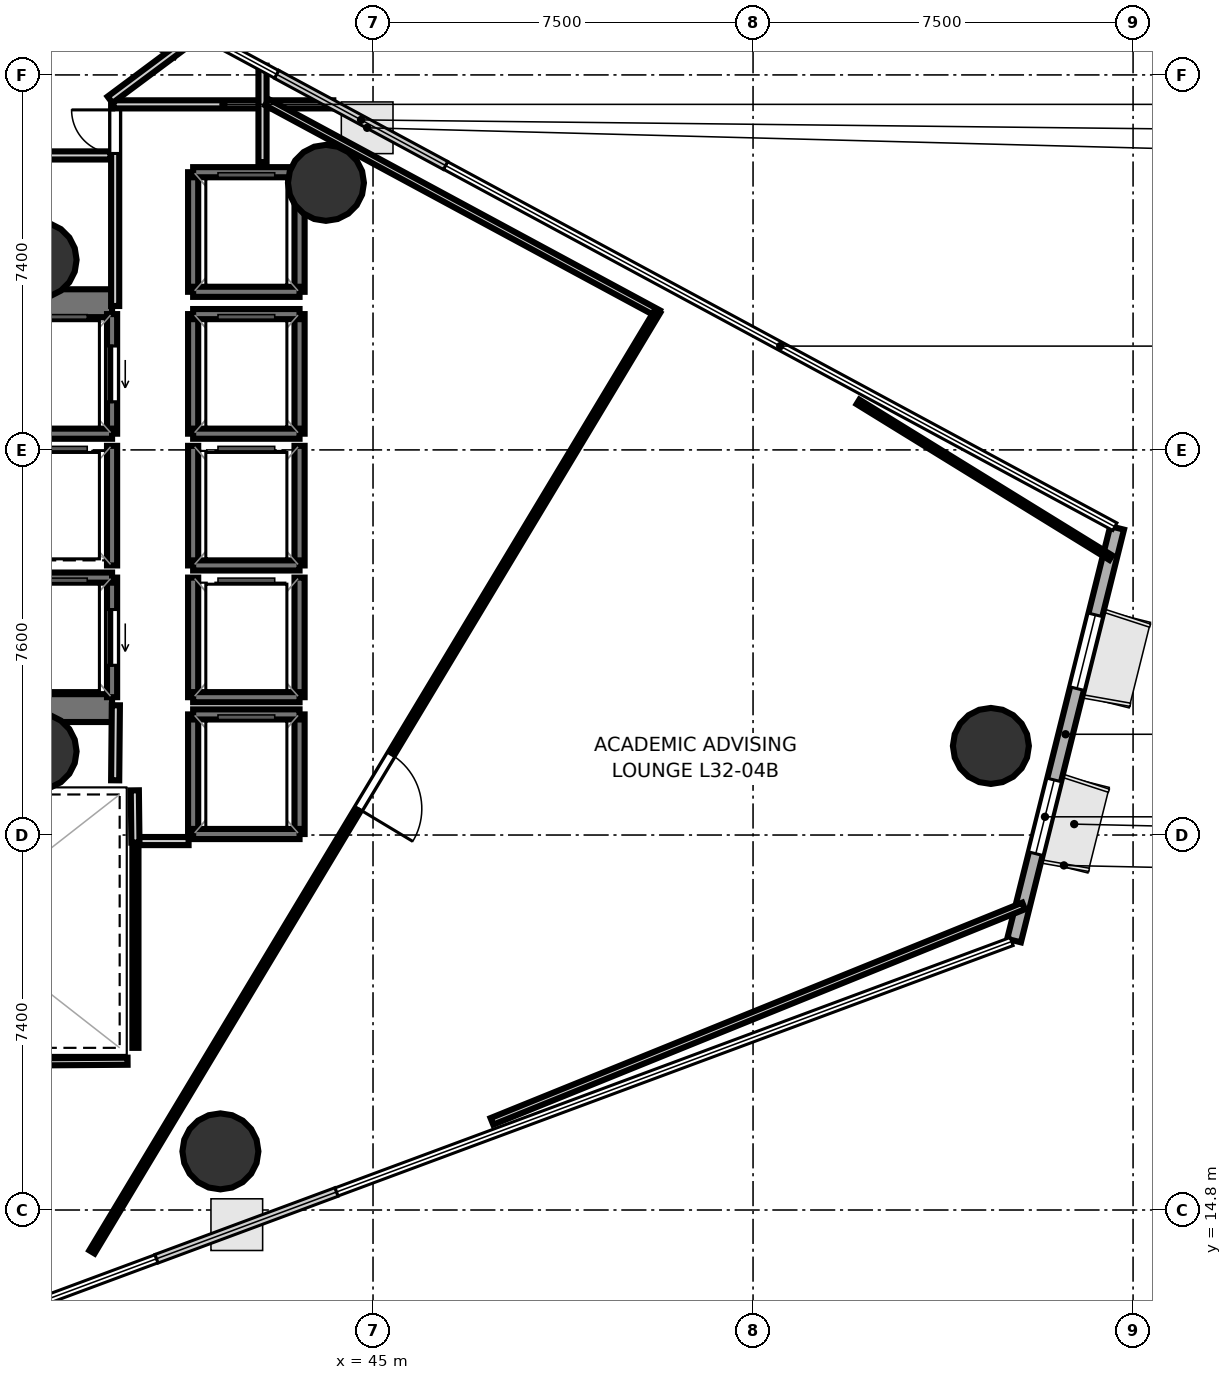
"""IFC4 building model, lengths in metres.
Left out: names, types, materials, properties, quantities, classifications, styles, units other than length and angle.
Written with IfcOpenShell. Run it as: python <this file> out.ifc"""

import sys

from ifc_helpers import new_model, si_unit, direction, frame, frame_2d, origin, origin_2d, place, context, subcontext, project, spatial, rectangle, hollow_circle, extrude, element, fill, save


model = new_model("IFC4")
c1 = context("Model", 3, precision=1e-05, world=origin(), true_north=direction((0.0, 1.0)))
c2 = subcontext(c1, "Body", "Model", "MODEL_VIEW")
j1 = project(units=[si_unit("LENGTHUNIT", "METRE"), si_unit("PLANEANGLEUNIT", "RADIAN")], contexts=[c1])
p1 = place(None, origin())
s1 = spatial("IfcSite", under=j1, at=p1, CompositionType="ELEMENT")
p2 = place(p1, origin())
s2 = spatial("IfcBuilding", under=s1, at=p2, CompositionType="ELEMENT")
p3 = place(p2, frame((0.0, 0.0, 127.4)))
s3 = spatial("IfcBuildingStorey", under=s2, at=p3, CompositionType="ELEMENT", Elevation=127.4)
p4 = place(p3, frame((29.23, 32.695, 0.0), z_axis=(0.0, 0.0, 1.0), x_axis=(1.0, 0.0, 0.0)))
e1 = element("IfcWall", 1, at=p4, inside=s3, PredefinedType="SHEAR", context=c2, shape_type="SweptSolid", body=[
    extrude(rectangle(XDim=10.62, YDim=0.55, at=frame_2d((5.31, 0.0))), origin(), (0.0, 0.0, 1.0), 3.52),
])
p5 = place(p4, frame((0.995, 0.0, 0.0)))
e2 = element("IfcOpeningElement", 2, at=p5, cuts=e1, PredefinedType="OPENING", context=c2, shape_type="SweptSolid", body=[
    extrude(rectangle(XDim=1.25, YDim=2.15, at=frame_2d((0.625, 1.075))), frame((0.0, 0.285, 0.0), z_axis=(0.0, -1.0, 0.0), x_axis=(1.0, 0.0, 0.0)), (0.0, 0.0, 1.0), 0.57),
])
p6 = place(p3, frame((29.23, 24.705, 0.0), z_axis=(0.0, 0.0, 1.0), x_axis=(1.0, 0.0, 0.0)))
e3 = element("IfcWall", 3, at=p6, inside=s3, PredefinedType="SHEAR", context=c2, shape_type="SweptSolid", body=[
    extrude(rectangle(XDim=10.62, YDim=0.55, at=frame_2d((5.31, 0.0))), origin(), (0.0, 0.0, 1.0), 3.52),
])
p7 = place(p6, frame((0.795, 0.0, 0.0)))
e4 = element("IfcOpeningElement", 4, at=p7, cuts=e3, PredefinedType="OPENING", context=c2, shape_type="SweptSolid", body=[
    extrude(rectangle(XDim=1.25, YDim=2.15, at=frame_2d((0.625, 1.075))), frame((0.0, 0.285, 0.0), z_axis=(0.0, -1.0, 0.0), x_axis=(1.0, 0.0, 0.0)), (0.0, 0.0, 1.0), 0.57),
])
for number, where, z_axis, x_axis in (
    (5, (38.4, 33.55, 0.0), (0.0, 0.0, 1.0), (1.0, 0.0, 0.0)),
    (6, (38.4, 23.85, 0.0), (0.0, 0.0, 1.0), (1.0, 0.0, 0.0)),
    (7, (57.194, 23.958, 0.0), (0.0, 0.0, 1.0), (1.0, 0.0, 0.0)),
    (8, (44.071, 35.07, 0.0), (0.0, 0.0, 1.0), (1.0, 0.0, 0.0)),
    (9, (41.988, 15.957, 0.0), (0.0, 0.0, 1.0), (1.0, 0.0, 0.0)),
):
    element("IfcColumn", number, at=place(p3, frame(where, z_axis=z_axis, x_axis=x_axis)), inside=s3, PredefinedType="COLUMN", context=c2, shape_type="SweptSolid", body=[
        extrude(hollow_circle(Radius=0.75, WallThickness=0.036, at=origin_2d()), origin(), (0.0, 0.0, 1.0), 3.7),
    ])
p8 = place(p3, frame((57.651, 20.116, 0.0), z_axis=(0.0, 0.0, 1.0), x_axis=(0.242323480978, 0.970195511516, 0.0)))
e10 = element("IfcWall", 10, at=p8, inside=s3, PredefinedType="SOLIDWALL", context=c2, shape_type="SweptSolid", body=[
    extrude(rectangle(XDim=8.395, YDim=0.28, at=frame_2d((4.197, 0.0))), origin(), (0.0, 0.0, 1.0), 3.52),
])
p9 = place(p8, frame((1.768, 0.0, 0.85)))
e11 = element("IfcOpeningElement", 11, at=p9, cuts=e10, PredefinedType="OPENING", context=c2, shape_type="SweptSolid", body=[
    extrude(rectangle(XDim=1.5, YDim=2.1, at=frame_2d((0.75, 1.05))), frame((0.0, 0.15, 0.0), z_axis=(0.0, -1.0, 0.0), x_axis=(1.0, 0.0, 0.0)), (0.0, 0.0, 1.0), 0.3),
])
p10 = place(p8, frame((5.126, 0.0, 0.85)))
e12 = element("IfcOpeningElement", 12, at=p10, cuts=e10, PredefinedType="OPENING", context=c2, shape_type="SweptSolid", body=[
    extrude(rectangle(XDim=1.5, YDim=2.1, at=frame_2d((0.75, 1.05))), frame((0.0, 0.15, 0.0), z_axis=(0.0, -1.0, 0.0), x_axis=(1.0, 0.0, 0.0)), (0.0, 0.0, 1.0), 0.3),
])
p11 = place(p3, frame((39.85, 30.12, 0.0), z_axis=(0.0, 0.0, 1.0), x_axis=(0.0, 1.0, 0.0)))
e13 = element("IfcWall", 13, at=p11, inside=s3, PredefinedType="SOLIDWALL", context=c2, shape_type="SweptSolid", body=[
    extrude(rectangle(XDim=2.36, YDim=0.2, at=frame_2d((1.18, 0.0))), origin(), (0.0, 0.0, 1.0), 3.52),
])
p12 = place(p11, frame((0.63, 0.0, 0.0)))
e14 = element("IfcOpeningElement", 14, at=p12, cuts=e13, PredefinedType="OPENING", context=c2, shape_type="SweptSolid", body=[
    extrude(rectangle(XDim=1.1, YDim=2.15, at=frame_2d((0.55, 1.075))), frame((0.0, 0.11, 0.0), z_axis=(0.0, -1.0, 0.0), x_axis=(1.0, 0.0, 0.0)), (0.0, 0.0, 1.0), 0.22),
])
p13 = place(p3, frame((37.75, 30.12, 0.0), z_axis=(0.0, 0.0, 1.0), x_axis=(1.0, 0.0, 0.0)))
e15 = element("IfcWall", 15, at=p13, inside=s3, PredefinedType="SOLIDWALL", context=c2, shape_type="SweptSolid", body=[
    extrude(rectangle(XDim=2.1, YDim=0.2, at=frame_2d((1.05, 0.0))), origin(), (0.0, 0.0, 1.0), 3.52),
])
p14 = place(p3, frame((39.85, 24.92, 0.0), z_axis=(0.0, 0.0, 1.0), x_axis=(0.0, 1.0, 0.0)))
e16 = element("IfcWall", 16, at=p14, inside=s3, PredefinedType="SOLIDWALL", context=c2, shape_type="SweptSolid", body=[
    extrude(rectangle(XDim=2.36, YDim=0.2, at=frame_2d((1.18, 0.0))), origin(), (0.0, 0.0, 1.0), 3.52),
])
p15 = place(p14, frame((0.63, 0.0, 0.0)))
e17 = element("IfcOpeningElement", 17, at=p15, cuts=e16, PredefinedType="OPENING", context=c2, shape_type="SweptSolid", body=[
    extrude(rectangle(XDim=1.1, YDim=2.15, at=frame_2d((0.55, 1.075))), frame((0.0, 0.11, 0.0), z_axis=(0.0, -1.0, 0.0), x_axis=(1.0, 0.0, 0.0)), (0.0, 0.0, 1.0), 0.22),
])
p16 = place(p3, frame((37.75, 27.28, 0.0), z_axis=(0.0, 0.0, 1.0), x_axis=(1.0, 0.0, 0.0)))
e18 = element("IfcWall", 18, at=p16, inside=s3, PredefinedType="SOLIDWALL", context=c2, shape_type="SweptSolid", body=[
    extrude(rectangle(XDim=2.1, YDim=0.2, at=frame_2d((1.05, 0.0))), origin(), (0.0, 0.0, 1.0), 3.52),
])
for number, where, z_axis, x_axis in (
    (19, (43.55, 30.12, 0.0), (0.0, 0.0, 1.0), (0.0, 1.0, 0.0)),
    (20, (41.45, 30.12, 0.0), (0.0, 0.0, 1.0), (0.0, 1.0, 0.0)),
):
    element("IfcWall", number, at=place(p3, frame(where, z_axis=z_axis, x_axis=x_axis)), inside=s3, PredefinedType="SOLIDWALL", context=c2, shape_type="SweptSolid", body=[
        extrude(rectangle(XDim=2.36, YDim=0.2, at=frame_2d((1.18, 0.0))), origin(), (0.0, 0.0, 1.0), 3.52),
    ])
for number, where, z_axis, x_axis in (
    (21, (41.45, 32.48, 0.0), (0.0, 0.0, 1.0), (1.0, 0.0, 0.0)),
    (22, (41.45, 30.12, 0.0), (0.0, 0.0, 1.0), (1.0, 0.0, 0.0)),
):
    element("IfcWall", number, at=place(p3, frame(where, z_axis=z_axis, x_axis=x_axis)), inside=s3, PredefinedType="SOLIDWALL", context=c2, shape_type="SweptSolid", body=[
        extrude(rectangle(XDim=2.1, YDim=0.2, at=frame_2d((1.05, 0.0))), origin(), (0.0, 0.0, 1.0), 3.52),
    ])
for number, where, z_axis, x_axis in (
    (23, (43.55, 27.52, 0.0), (0.0, 0.0, 1.0), (0.0, 1.0, 0.0)),
    (24, (41.45, 27.52, 0.0), (0.0, 0.0, 1.0), (0.0, 1.0, 0.0)),
):
    element("IfcWall", number, at=place(p3, frame(where, z_axis=z_axis, x_axis=x_axis)), inside=s3, PredefinedType="SOLIDWALL", context=c2, shape_type="SweptSolid", body=[
        extrude(rectangle(XDim=2.36, YDim=0.2, at=frame_2d((1.18, 0.0))), origin(), (0.0, 0.0, 1.0), 3.52),
    ])
p17 = place(p3, frame((41.45, 27.52, 0.0), z_axis=(0.0, 0.0, 1.0), x_axis=(1.0, 0.0, 0.0)))
e25 = element("IfcWall", 25, at=p17, inside=s3, PredefinedType="SOLIDWALL", context=c2, shape_type="SweptSolid", body=[
    extrude(rectangle(XDim=2.1, YDim=0.2, at=frame_2d((1.05, 0.0))), origin(), (0.0, 0.0, 1.0), 3.52),
])
for number, where, z_axis, x_axis in (
    (26, (43.55, 24.92, 0.0), (0.0, 0.0, 1.0), (0.0, 1.0, 0.0)),
    (27, (41.45, 24.92, 0.0), (0.0, 0.0, 1.0), (0.0, 1.0, 0.0)),
):
    element("IfcWall", number, at=place(p3, frame(where, z_axis=z_axis, x_axis=x_axis)), inside=s3, PredefinedType="SOLIDWALL", context=c2, shape_type="SweptSolid", body=[
        extrude(rectangle(XDim=2.36, YDim=0.2, at=frame_2d((1.18, 0.0))), origin(), (0.0, 0.0, 1.0), 3.52),
    ])
p18 = place(p3, frame((41.45, 24.92, 0.0), z_axis=(0.0, 0.0, 1.0), x_axis=(1.0, 0.0, 0.0)))
e28 = element("IfcWall", 28, at=p18, inside=s3, PredefinedType="SOLIDWALL", context=c2, shape_type="SweptSolid", body=[
    extrude(rectangle(XDim=2.1, YDim=0.2, at=frame_2d((1.05, 0.0))), origin(), (0.0, 0.0, 1.0), 3.52),
])
p19 = place(p3, frame((39.85, 27.52, 0.0), z_axis=(0.0, 0.0, 1.0), x_axis=(0.0, 1.0, 0.0)))
e29 = element("IfcWall", 29, at=p19, inside=s3, PredefinedType="SOLIDWALL", context=c2, shape_type="SweptSolid", body=[
    extrude(rectangle(XDim=2.36, YDim=0.2, at=frame_2d((1.18, 0.0))), origin(), (0.0, 0.0, 1.0), 3.52),
])
for number, where, z_axis, x_axis in (
    (30, (43.55, 22.22, 0.0), (0.0, 0.0, 1.0), (0.0, 1.0, 0.0)),
    (31, (41.45, 22.22, 0.0), (0.0, 0.0, 1.0), (0.0, 1.0, 0.0)),
):
    element("IfcWall", number, at=place(p3, frame(where, z_axis=z_axis, x_axis=x_axis)), inside=s3, PredefinedType="SOLIDWALL", context=c2, shape_type="SweptSolid", body=[
        extrude(rectangle(XDim=2.36, YDim=0.2, at=frame_2d((1.18, 0.0))), origin(), (0.0, 0.0, 1.0), 3.52),
    ])
for number, where, z_axis, x_axis in (
    (32, (41.45, 24.58, 0.0), (0.0, 0.0, 1.0), (1.0, 0.0, 0.0)),
    (33, (41.45, 22.22, 0.0), (0.0, 0.0, 1.0), (1.0, 0.0, 0.0)),
):
    element("IfcWall", number, at=place(p3, frame(where, z_axis=z_axis, x_axis=x_axis)), inside=s3, PredefinedType="SOLIDWALL", context=c2, shape_type="SweptSolid", body=[
        extrude(rectangle(XDim=2.1, YDim=0.2, at=frame_2d((1.05, 0.0))), origin(), (0.0, 0.0, 1.0), 3.52),
    ])
for number, where, z_axis, x_axis in (
    (34, (43.55, 32.92, 0.0), (0.0, 0.0, 1.0), (0.0, 1.0, 0.0)),
    (35, (41.45, 32.92, 0.0), (0.0, 0.0, 1.0), (0.0, 1.0, 0.0)),
):
    element("IfcWall", number, at=place(p3, frame(where, z_axis=z_axis, x_axis=x_axis)), inside=s3, PredefinedType="SOLIDWALL", context=c2, shape_type="SweptSolid", body=[
        extrude(rectangle(XDim=2.36, YDim=0.2, at=frame_2d((1.18, 0.0))), origin(), (0.0, 0.0, 1.0), 3.52),
    ])
for number, where, z_axis, x_axis in (
    (36, (41.45, 35.28, 0.0), (0.0, 0.0, 1.0), (1.0, 0.0, 0.0)),
    (37, (41.45, 32.92, 0.0), (0.0, 0.0, 1.0), (1.0, 0.0, 0.0)),
):
    element("IfcWall", number, at=place(p3, frame(where, z_axis=z_axis, x_axis=x_axis)), inside=s3, PredefinedType="SOLIDWALL", context=c2, shape_type="SweptSolid", body=[
        extrude(rectangle(XDim=2.1, YDim=0.2, at=frame_2d((1.05, 0.0))), origin(), (0.0, 0.0, 1.0), 3.52),
    ])
p20 = place(p3, frame((39.911, 32.64, 0.0), z_axis=(0.0, 0.0, 1.0), x_axis=(0.0, 1.0, 0.0)))
e38 = element("IfcWall", 38, at=p20, inside=s3, PredefinedType="PARTITIONING", context=c2, shape_type="SweptSolid", body=[
    extrude(rectangle(XDim=4.01, YDim=0.16, at=frame_2d((2.005, 0.0))), origin(), (0.0, 0.0, 1.0), 2.84),
])
p21 = place(p20, frame((3.01, 0.0, 0.0)))
e39 = element("IfcOpeningElement", 39, at=p21, cuts=e38, PredefinedType="OPENING", context=c2, shape_type="SweptSolid", body=[
    extrude(rectangle(XDim=0.86, YDim=2.05, at=frame_2d((0.43, 1.025))), frame((0.0, 0.09, 0.0), z_axis=(0.0, -1.0, 0.0), x_axis=(1.0, 0.0, 0.0)), (0.0, 0.0, 1.0), 0.18),
])
p22 = place(p3, frame((39.88, 36.619, 0.0), z_axis=(0.0, 0.0, 1.0), x_axis=(1.0, 0.0, 0.0)))
e40 = element("IfcWall", 40, at=p22, inside=s3, PredefinedType="PARTITIONING", context=c2, shape_type="SweptSolid", body=[
    extrude(rectangle(XDim=4.336, YDim=0.16, at=frame_2d((2.168, 0.0))), origin(), (0.0, 0.0, 1.0), 2.84),
])
p23 = place(p3, frame((42.819, 37.382, 0.0), z_axis=(0.0, 0.0, 1.0), x_axis=(0.0, -1.0, 0.0)))
e41 = element("IfcWall", 41, at=p23, inside=s3, PredefinedType="PARTITIONING", context=c2, shape_type="SweptSolid", body=[
    extrude(rectangle(XDim=1.902, YDim=0.16, at=frame_2d((0.951, 0.0))), origin(), (0.0, 0.0, 1.0), 2.84),
])
p24 = place(p3, frame((41.36, 22.081, 0.0), z_axis=(0.0, 0.0, 1.0), x_axis=(-1.0, 0.0, 0.0)))
e42 = element("IfcWall", 42, at=p24, inside=s3, PredefinedType="PARTITIONING", context=c2, shape_type="SweptSolid", body=[
    extrude(rectangle(XDim=1.08, YDim=0.16, at=frame_2d((0.54, 0.0))), origin(), (0.0, 0.0, 1.0), 2.84),
])
p25 = place(p3, frame((40.311, 22.05, 0.0), z_axis=(0.0, 0.0, 1.0), x_axis=(-0.011836292006, 0.999929948642, 0.0)))
e43 = element("IfcWall", 43, at=p25, inside=s3, PredefinedType="PARTITIONING", context=c2, shape_type="SweptSolid", body=[
    extrude(rectangle(XDim=1.031, YDim=0.16, at=frame_2d((0.516, 0.0))), origin(), (0.0, 0.0, 1.0), 2.84),
])
p26 = place(p3, frame((39.911, 23.28, 0.0), z_axis=(0.0, 0.0, 1.0), x_axis=(0.009397771291, 0.999955839972, 0.0)))
e44 = element("IfcWall", 44, at=p26, inside=s3, PredefinedType="PARTITIONING", context=c2, shape_type="SweptSolid", body=[
    extrude(rectangle(XDim=1.481, YDim=0.16, at=frame_2d((0.74, 0.0))), origin(), (0.0, 0.0, 1.0), 2.84),
])
p27 = place(p3, frame((39.641, 38.423, 0.0), z_axis=(0.0, 0.0, 1.0), x_axis=(0.880063734577, -0.474855581289, 0.0)))
e45 = element("IfcWall", 45, at=p27, inside=s3, PredefinedType="PARTITIONING", context=c2, shape_type="SweptSolid", body=[
    extrude(rectangle(XDim=1.676, YDim=0.16, at=frame_2d((0.838, 0.0))), origin(), (0.0, 0.0, 1.0), 2.84),
])
p28 = place(p3, frame((41.598, 38.042, 0.0), z_axis=(0.0, 0.0, 1.0), x_axis=(-0.801927049696, -0.597421967261, 0.0)))
e46 = element("IfcWall", 46, at=p28, inside=s3, PredefinedType="PARTITIONING", context=c2, shape_type="SweptSolid", body=[
    extrude(rectangle(XDim=2.23, YDim=0.16, at=frame_2d((1.115, 0.0))), origin(), (0.0, 0.0, 1.0), 2.84),
])
p29 = place(p3, frame((39.818, 35.611, 0.0), z_axis=(0.0, 0.0, 1.0), x_axis=(-1.0, 0.0, 0.0)))
e47 = element("IfcWall", 47, at=p29, inside=s3, PredefinedType="PARTITIONING", context=c2, shape_type="SweptSolid", body=[
    extrude(rectangle(XDim=2.768, YDim=0.16, at=frame_2d((1.384, 0.0))), origin(), (0.0, 0.0, 1.0), 2.84),
])
p30 = place(p3, frame((42.906, 36.661, 0.0), z_axis=(0.0, 0.0, 1.0), x_axis=(0.880037490499, -0.474904216991, 0.0)))
e48 = element("IfcWall", 48, at=p30, inside=s3, PredefinedType="PARTITIONING", context=c2, shape_type="SweptSolid", body=[
    extrude(rectangle(XDim=8.776, YDim=0.14, at=frame_2d((4.388, 0.0))), origin(), (0.0, 0.0, 1.0), 2.84),
])
p31 = place(p3, frame((50.617, 32.537, 0.0), z_axis=(0.0, 0.0, 1.0), x_axis=(-0.515345747217, -0.85698235736, 0.0)))
e49 = element("IfcWall", 49, at=p31, inside=s3, PredefinedType="PARTITIONING", context=c2, shape_type="SweptSolid", body=[
    extrude(rectangle(XDim=21.662, YDim=0.12, at=frame_2d((10.831, 0.0))), origin(), (0.0, 0.0, 1.0), 2.84),
])
p32 = place(p31, frame((10.206, 0.0, 0.0)))
e50 = element("IfcOpeningElement", 50, at=p32, cuts=e49, PredefinedType="OPENING", context=c2, shape_type="SweptSolid", body=[
    extrude(rectangle(XDim=1.25, YDim=2.2, at=frame_2d((0.625, 1.1))), frame((0.0, 0.07, 0.0), z_axis=(0.0, -1.0, 0.0), x_axis=(1.0, 0.0, 0.0)), (0.0, 0.0, 1.0), 0.14),
])
p33 = place(p3, frame((33.6, 17.689, 0.0), z_axis=(0.0, 0.0, 1.0), x_axis=(0.999974170588, 0.007187360901, 0.0)))
e51 = element("IfcWall", 51, at=p33, inside=s3, PredefinedType="PARTITIONING", context=c2, shape_type="SweptSolid", body=[
    extrude(rectangle(XDim=6.556, YDim=0.14, at=frame_2d((3.278, 0.0))), origin(), (0.0, 0.0, 1.0), 2.84),
])
p34 = place(p3, frame((40.311, 18.0, 0.0), z_axis=(0.0, 0.0, 1.0), x_axis=(0.0, 1.0, 0.0)))
e52 = element("IfcWall", 52, at=p34, inside=s3, PredefinedType="PARTITIONING", context=c2, shape_type="SweptSolid", body=[
    extrude(rectangle(XDim=3.97, YDim=0.12, at=frame_2d((1.985, 0.0))), origin(), (0.0, 0.0, 1.0), 2.84),
])
p35 = place(p3, frame((57.839, 20.8, 0.0), z_axis=(0.0, 0.0, 1.0), x_axis=(-0.926836238632, -0.375465826353, 0.0)))
e53 = element("IfcWall", 53, at=p35, inside=s3, PredefinedType="PARTITIONING", context=c2, shape_type="SweptSolid", body=[
    extrude(rectangle(XDim=11.321, YDim=0.14, at=frame_2d((5.661, 0.0))), origin(), (0.0, 0.0, 1.0), 2.84),
])
p36 = place(p3, frame((54.571, 30.748, 0.0), z_axis=(0.0, 0.0, 1.0), x_axis=(0.851354831439, -0.524590269625, 0.0)))
e54 = element("IfcWall", 54, at=p36, inside=s3, PredefinedType="PARTITIONING", context=c2, shape_type="SweptSolid", body=[
    extrude(rectangle(XDim=5.858, YDim=0.105, at=frame_2d((2.929, 0.0))), origin(), (0.0, 0.0, 1.0), 2.84),
])
p37 = place(p12, origin())
e55 = element("IfcDoor", 55, at=p37, inside=s3, OperationType="SLIDING_TO_LEFT", PredefinedType="DOOR", context=c2, shape_type="SweptSolid", body=[
    extrude(rectangle(XDim=1.1, YDim=2.15, at=frame_2d((0.55, 1.075))), frame((0.0, 0.025, 0.0), z_axis=(0.0, -1.0, 0.0), x_axis=(1.0, 0.0, 0.0)), (0.0, 0.0, 1.0), 0.05),
])
fill(e14, e55)
p38 = place(p15, origin())
e56 = element("IfcDoor", 56, at=p38, inside=s3, OperationType="SLIDING_TO_LEFT", PredefinedType="DOOR", context=c2, shape_type="SweptSolid", body=[
    extrude(rectangle(XDim=1.1, YDim=2.15, at=frame_2d((0.55, 1.075))), frame((0.0, 0.025, 0.0), z_axis=(0.0, -1.0, 0.0), x_axis=(1.0, 0.0, 0.0)), (0.0, 0.0, 1.0), 0.05),
])
fill(e17, e56)
p39 = place(p21, origin())
e57 = element("IfcDoor", 57, at=p39, inside=s3, OperationType="SINGLE_SWING_RIGHT", PredefinedType="DOOR", context=c2, shape_type="SweptSolid", body=[
    extrude(rectangle(XDim=0.86, YDim=2.05, at=frame_2d((0.43, 1.025))), frame((0.0, 0.025, 0.0), z_axis=(0.0, -1.0, 0.0), x_axis=(1.0, 0.0, 0.0)), (0.0, 0.0, 1.0), 0.05),
])
fill(e39, e57)
p40 = place(p32, origin())
e58 = element("IfcDoor", 58, at=p40, inside=s3, OperationType="SINGLE_SWING_RIGHT", PredefinedType="DOOR", context=c2, shape_type="SweptSolid", body=[
    extrude(rectangle(XDim=1.25, YDim=2.2, at=frame_2d((0.625, 1.1))), frame((0.0, 0.025, 0.0), z_axis=(0.0, -1.0, 0.0), x_axis=(1.0, 0.0, 0.0)), (0.0, 0.0, 1.0), 0.05),
])
fill(e50, e58)
p41 = place(p9, origin())
e59 = element("IfcWindow", 59, at=p41, inside=s3, PartitioningType="SINGLE_PANEL", PredefinedType="WINDOW", context=c2, shape_type="SweptSolid", body=[
    extrude(rectangle(XDim=1.5, YDim=2.1, at=frame_2d((0.75, 1.05))), frame((0.0, 0.03, 0.0), z_axis=(0.0, -1.0, 0.0), x_axis=(1.0, 0.0, 0.0)), (0.0, 0.0, 1.0), 0.06),
])
fill(e11, e59)
p42 = place(p10, origin())
e60 = element("IfcWindow", 60, at=p42, inside=s3, PartitioningType="SINGLE_PANEL", PredefinedType="WINDOW", context=c2, shape_type="SweptSolid", body=[
    extrude(rectangle(XDim=1.5, YDim=2.1, at=frame_2d((0.75, 1.05))), frame((0.0, 0.03, 0.0), z_axis=(0.0, -1.0, 0.0), x_axis=(1.0, 0.0, 0.0)), (0.0, 0.0, 1.0), 0.06),
])
fill(e12, e60)
save(model, sys.argv[1])
